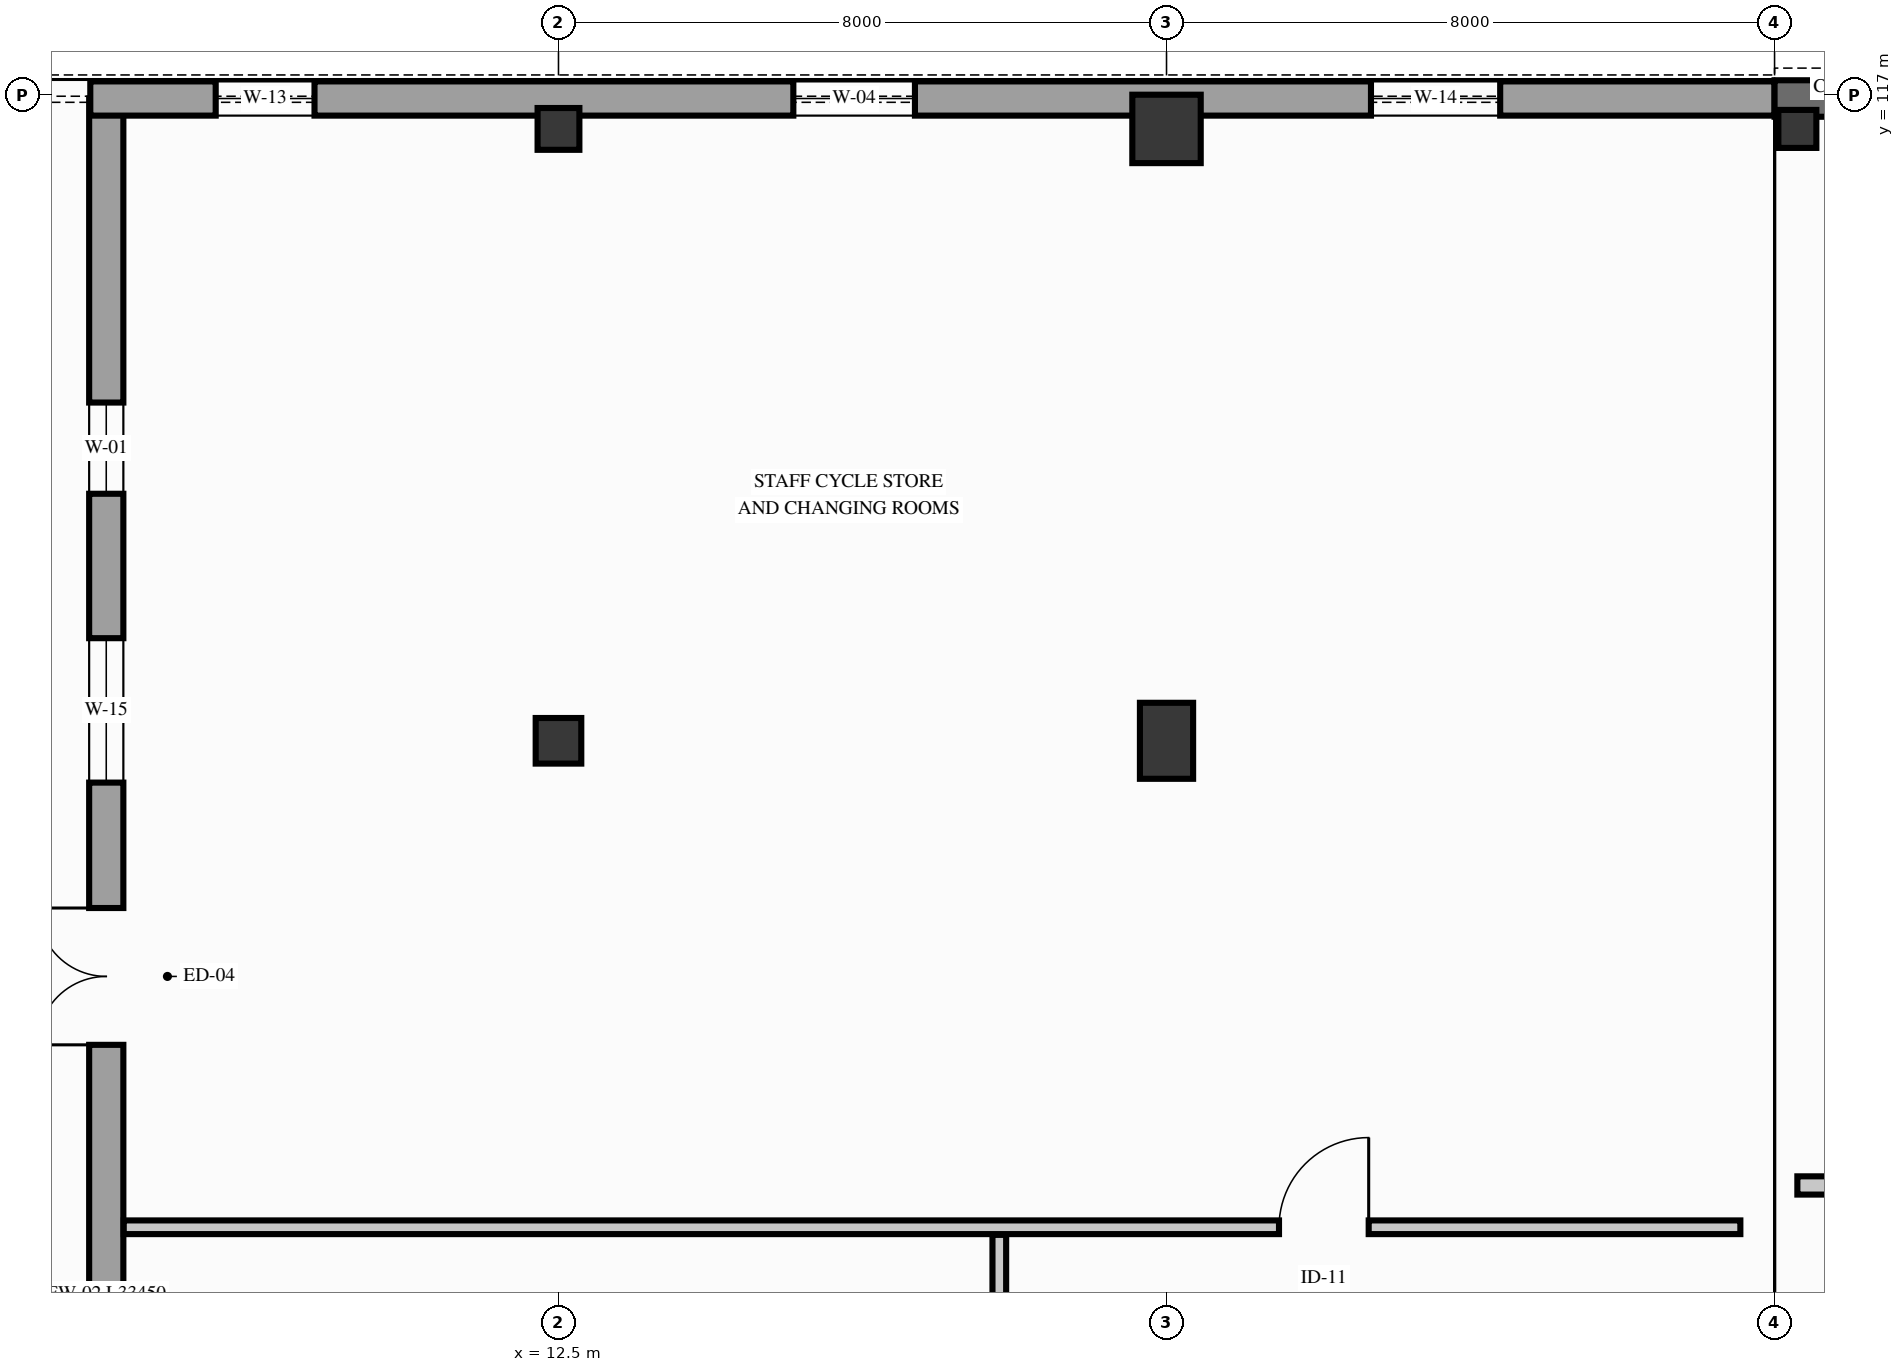
"""IFC4 building model, lengths in metres.
Left out: names, types, materials, properties, quantities, classifications, styles, units other than length and angle.
Written with IfcOpenShell. Run it as: python <this file> out.ifc"""

import sys

from ifc_helpers import new_model, si_unit, direction, frame, frame_2d, origin, origin_2d, place, context, subcontext, project, spatial, rectangle, extrude, element, fill, save


model = new_model("IFC4")
c1 = context("Model", 3, precision=1e-05, world=origin(), true_north=direction((0.0, 1.0)))
c2 = subcontext(c1, "Body", "Model", "MODEL_VIEW")
j1 = project(units=[si_unit("LENGTHUNIT", "METRE"), si_unit("PLANEANGLEUNIT", "RADIAN")], contexts=[c1])
p1 = place(None, origin())
s1 = spatial("IfcSite", under=j1, at=p1, CompositionType="ELEMENT")
p2 = place(p1, origin())
s2 = spatial("IfcBuilding", under=s1, at=p2, CompositionType="ELEMENT")
p3 = place(p2, origin())
s3 = spatial("IfcBuildingStorey", under=s2, at=p3, CompositionType="ELEMENT", Elevation=0.0)
p4 = place(p3, frame((28.8, 116.55, 0.0), z_axis=(0.0, 0.0, 1.0), x_axis=(1.0, 0.0, 0.0)))
e1 = element("IfcColumn", 1, at=p4, inside=s3, PredefinedType="COLUMN", context=c2, shape_type="SweptSolid", body=[
    extrude(rectangle(XDim=0.5, YDim=0.5, at=origin_2d()), origin(), (0.0, 0.0, 1.0), 5.1),
])
p5 = place(p3, frame((12.5, 108.5, 0.0), z_axis=(0.0, 0.0, 1.0), x_axis=(1.0, 0.0, 0.0)))
e2 = element("IfcColumn", 2, at=p5, inside=s3, PredefinedType="COLUMN", context=c2, shape_type="SweptSolid", body=[
    extrude(rectangle(XDim=0.6, YDim=0.6, at=origin_2d()), origin(), (0.0, 0.0, 1.0), 5.1),
])
p6 = place(p3, frame((12.5, 116.55, 0.0), z_axis=(0.0, 0.0, 1.0), x_axis=(1.0, 0.0, 0.0)))
e3 = element("IfcColumn", 3, at=p6, inside=s3, PredefinedType="COLUMN", context=c2, shape_type="SweptSolid", body=[
    extrude(rectangle(XDim=0.55, YDim=0.55, at=origin_2d()), origin(), (0.0, 0.0, 1.0), 5.1),
])
p7 = place(p3, frame((20.5, 108.5, 0.0), z_axis=(0.0, 0.0, 1.0), x_axis=(1.0, 0.0, 0.0)))
e4 = element("IfcColumn", 4, at=p7, inside=s3, PredefinedType="COLUMN", context=c2, shape_type="SweptSolid", body=[
    extrude(rectangle(XDim=0.7, YDim=1.0, at=origin_2d()), origin(), (0.0, 0.0, 1.0), 5.1),
])
p8 = place(p3, frame((20.5, 116.55, 0.0), z_axis=(0.0, 0.0, 1.0), x_axis=(1.0, 0.0, 0.0)))
e5 = element("IfcColumn", 5, at=p8, inside=s3, PredefinedType="COLUMN", context=c2, shape_type="SweptSolid", body=[
    extrude(rectangle(XDim=0.9, YDim=0.9, at=origin_2d()), origin(), (0.0, 0.0, 1.0), 5.1),
])
p9 = place(p3, frame((6.55, 83.5, 0.0), z_axis=(0.0, 0.0, 1.0), x_axis=(0.0, 1.0, 0.0)))
e6 = element("IfcWall", 6, at=p9, inside=s3, PredefinedType="SOLIDWALL", context=c2, shape_type="SweptSolid", body=[
    extrude(rectangle(XDim=33.45, YDim=0.45, at=frame_2d((16.725, 0.0))), origin(), (0.0, 0.0, 1.0), 4.418),
])
p10 = place(p9, frame((21.0, 0.0, 0.0)))
e7 = element("IfcOpeningElement", 7, at=p10, cuts=e6, PredefinedType="OPENING", context=c2, shape_type="SweptSolid", body=[
    extrude(rectangle(XDim=1.8, YDim=2.4, at=frame_2d((0.9, 1.2))), frame((0.0, 0.235, 0.0), z_axis=(0.0, -1.0, 0.0), x_axis=(1.0, 0.0, 0.0)), (0.0, 0.0, 1.0), 0.47),
])
p11 = place(p9, frame((1.65, 0.0, 0.85)))
e8 = element("IfcOpeningElement", 8, at=p11, cuts=e6, PredefinedType="OPENING", context=c2, shape_type="SweptSolid", body=[
    extrude(rectangle(XDim=1.3, YDim=2.15, at=frame_2d((0.65, 1.075))), frame((0.0, 0.235, 0.0), z_axis=(0.0, -1.0, 0.0), x_axis=(1.0, 0.0, 0.0)), (0.0, 0.0, 1.0), 0.47),
])
p12 = place(p9, frame((5.45, 0.0, 0.85)))
e9 = element("IfcOpeningElement", 9, at=p12, cuts=e6, PredefinedType="OPENING", context=c2, shape_type="SweptSolid", body=[
    extrude(rectangle(XDim=1.5, YDim=2.3, at=frame_2d((0.75, 1.15))), frame((0.0, 0.235, 0.0), z_axis=(0.0, -1.0, 0.0), x_axis=(1.0, 0.0, 0.0)), (0.0, 0.0, 1.0), 0.47),
])
p13 = place(p9, frame((9.25, 0.0, 0.85)))
e10 = element("IfcOpeningElement", 10, at=p13, cuts=e6, PredefinedType="OPENING", context=c2, shape_type="SweptSolid", body=[
    extrude(rectangle(XDim=1.6, YDim=2.4, at=frame_2d((0.8, 1.2))), frame((0.0, 0.235, 0.0), z_axis=(0.0, -1.0, 0.0), x_axis=(1.0, 0.0, 0.0)), (0.0, 0.0, 1.0), 0.47),
])
p14 = place(p9, frame((13.05, 0.0, 0.85)))
e11 = element("IfcOpeningElement", 11, at=p14, cuts=e6, PredefinedType="OPENING", context=c2, shape_type="SweptSolid", body=[
    extrude(rectangle(XDim=1.4, YDim=2.2, at=frame_2d((0.7, 1.1))), frame((0.0, 0.235, 0.0), z_axis=(0.0, -1.0, 0.0), x_axis=(1.0, 0.0, 0.0)), (0.0, 0.0, 1.0), 0.47),
])
p15 = place(p9, frame((24.45, 0.0, 0.85)))
e12 = element("IfcOpeningElement", 12, at=p15, cuts=e6, PredefinedType="OPENING", context=c2, shape_type="SweptSolid", body=[
    extrude(rectangle(XDim=1.9, YDim=2.45, at=frame_2d((0.95, 1.225))), frame((0.0, 0.235, 0.0), z_axis=(0.0, -1.0, 0.0), x_axis=(1.0, 0.0, 0.0)), (0.0, 0.0, 1.0), 0.47),
])
p16 = place(p9, frame((28.25, 0.0, 0.85)))
e13 = element("IfcOpeningElement", 13, at=p16, cuts=e6, PredefinedType="OPENING", context=c2, shape_type="SweptSolid", body=[
    extrude(rectangle(XDim=1.2, YDim=2.1, at=frame_2d((0.6, 1.05))), frame((0.0, 0.235, 0.0), z_axis=(0.0, -1.0, 0.0), x_axis=(1.0, 0.0, 0.0)), (0.0, 0.0, 1.0), 0.47),
])
p17 = place(p3, frame((6.34, 116.95, 0.0), z_axis=(0.0, 0.0, 1.0), x_axis=(1.0, 0.0, 0.0)))
e14 = element("IfcWall", 14, at=p17, inside=s3, PredefinedType="SOLIDWALL", context=c2, shape_type="SweptSolid", body=[
    extrude(rectangle(XDim=22.16, YDim=0.45, at=frame_2d((11.08, 0.0))), origin(), (0.0, 0.0, 1.0), 4.88),
])
p18 = place(p17, frame((1.65, 0.0, 0.85)))
e15 = element("IfcOpeningElement", 15, at=p18, cuts=e14, PredefinedType="OPENING", context=c2, shape_type="SweptSolid", body=[
    extrude(rectangle(XDim=1.3, YDim=2.15, at=frame_2d((0.65, 1.075))), frame((0.0, 0.235, 0.0), z_axis=(0.0, -1.0, 0.0), x_axis=(1.0, 0.0, 0.0)), (0.0, 0.0, 1.0), 0.47),
])
p19 = place(p17, frame((9.25, 0.0, 0.85)))
e16 = element("IfcOpeningElement", 16, at=p19, cuts=e14, PredefinedType="OPENING", context=c2, shape_type="SweptSolid", body=[
    extrude(rectangle(XDim=1.6, YDim=2.4, at=frame_2d((0.8, 1.2))), frame((0.0, 0.235, 0.0), z_axis=(0.0, -1.0, 0.0), x_axis=(1.0, 0.0, 0.0)), (0.0, 0.0, 1.0), 0.47),
])
p20 = place(p17, frame((16.85, 0.0, 0.85)))
e17 = element("IfcOpeningElement", 17, at=p20, cuts=e14, PredefinedType="OPENING", context=c2, shape_type="SweptSolid", body=[
    extrude(rectangle(XDim=1.7, YDim=2.35, at=frame_2d((0.85, 1.175))), frame((0.0, 0.235, 0.0), z_axis=(0.0, -1.0, 0.0), x_axis=(1.0, 0.0, 0.0)), (0.0, 0.0, 1.0), 0.47),
])
p21 = place(p3, frame((28.5, 116.95, 0.0), z_axis=(0.0, 0.0, 1.0), x_axis=(1.0, 0.0, 0.0)))
e18 = element("IfcWall", 18, at=p21, inside=s3, PredefinedType="SOLIDWALL", context=c2, shape_type="SweptSolid", body=[
    extrude(rectangle(XDim=95.25, YDim=0.48, at=frame_2d((47.625, 0.0))), origin(), (0.0, 0.0, 1.0), 4.88),
])
p22 = place(p21, frame((1.65, 0.0, 1.35)))
e19 = element("IfcOpeningElement", 19, at=p22, cuts=e18, PredefinedType="OPENING", context=c2, shape_type="SweptSolid", body=[
    extrude(rectangle(XDim=1.4, YDim=2.2, at=frame_2d((0.7, 1.1))), frame((0.0, 0.25, 0.0), z_axis=(0.0, -1.0, 0.0), x_axis=(1.0, 0.0, 0.0)), (0.0, 0.0, 1.0), 0.5),
])
p23 = place(p21, frame((5.65, 0.0, 1.35)))
e20 = element("IfcOpeningElement", 20, at=p23, cuts=e18, PredefinedType="OPENING", context=c2, shape_type="SweptSolid", body=[
    extrude(rectangle(XDim=1.2, YDim=2.1, at=frame_2d((0.6, 1.05))), frame((0.0, 0.25, 0.0), z_axis=(0.0, -1.0, 0.0), x_axis=(1.0, 0.0, 0.0)), (0.0, 0.0, 1.0), 0.5),
])
p24 = place(p21, frame((13.65, 0.0, 1.35)))
e21 = element("IfcOpeningElement", 21, at=p24, cuts=e18, PredefinedType="OPENING", context=c2, shape_type="SweptSolid", body=[
    extrude(rectangle(XDim=1.0, YDim=1.6, at=frame_2d((0.5, 0.8))), frame((0.0, 0.25, 0.0), z_axis=(0.0, -1.0, 0.0), x_axis=(1.0, 0.0, 0.0)), (0.0, 0.0, 1.0), 0.5),
])
p25 = place(p21, frame((21.65, 0.0, 1.35)))
e22 = element("IfcOpeningElement", 22, at=p25, cuts=e18, PredefinedType="OPENING", context=c2, shape_type="SweptSolid", body=[
    extrude(rectangle(XDim=1.2, YDim=2.1, at=frame_2d((0.6, 1.05))), frame((0.0, 0.25, 0.0), z_axis=(0.0, -1.0, 0.0), x_axis=(1.0, 0.0, 0.0)), (0.0, 0.0, 1.0), 0.5),
])
p26 = place(p21, frame((25.65, 0.0, 1.35)))
e23 = element("IfcOpeningElement", 23, at=p26, cuts=e18, PredefinedType="OPENING", context=c2, shape_type="SweptSolid", body=[
    extrude(rectangle(XDim=1.1, YDim=1.5, at=frame_2d((0.55, 0.75))), frame((0.0, 0.25, 0.0), z_axis=(0.0, -1.0, 0.0), x_axis=(1.0, 0.0, 0.0)), (0.0, 0.0, 1.0), 0.5),
])
p27 = place(p21, frame((29.65, 0.0, 1.35)))
e24 = element("IfcOpeningElement", 24, at=p27, cuts=e18, PredefinedType="OPENING", context=c2, shape_type="SweptSolid", body=[
    extrude(rectangle(XDim=1.0, YDim=1.6, at=frame_2d((0.5, 0.8))), frame((0.0, 0.25, 0.0), z_axis=(0.0, -1.0, 0.0), x_axis=(1.0, 0.0, 0.0)), (0.0, 0.0, 1.0), 0.5),
])
p28 = place(p21, frame((37.65, 0.0, 1.35)))
e25 = element("IfcOpeningElement", 25, at=p28, cuts=e18, PredefinedType="OPENING", context=c2, shape_type="SweptSolid", body=[
    extrude(rectangle(XDim=1.2, YDim=2.1, at=frame_2d((0.6, 1.05))), frame((0.0, 0.25, 0.0), z_axis=(0.0, -1.0, 0.0), x_axis=(1.0, 0.0, 0.0)), (0.0, 0.0, 1.0), 0.5),
])
p29 = place(p21, frame((41.65, 0.0, 1.35)))
e26 = element("IfcOpeningElement", 26, at=p29, cuts=e18, PredefinedType="OPENING", context=c2, shape_type="SweptSolid", body=[
    extrude(rectangle(XDim=1.1, YDim=1.5, at=frame_2d((0.55, 0.75))), frame((0.0, 0.25, 0.0), z_axis=(0.0, -1.0, 0.0), x_axis=(1.0, 0.0, 0.0)), (0.0, 0.0, 1.0), 0.5),
])
p30 = place(p21, frame((45.65, 0.0, 1.35)))
e27 = element("IfcOpeningElement", 27, at=p30, cuts=e18, PredefinedType="OPENING", context=c2, shape_type="SweptSolid", body=[
    extrude(rectangle(XDim=1.0, YDim=1.6, at=frame_2d((0.5, 0.8))), frame((0.0, 0.25, 0.0), z_axis=(0.0, -1.0, 0.0), x_axis=(1.0, 0.0, 0.0)), (0.0, 0.0, 1.0), 0.5),
])
p31 = place(p21, frame((57.65, 0.0, 1.35)))
e28 = element("IfcOpeningElement", 28, at=p31, cuts=e18, PredefinedType="OPENING", context=c2, shape_type="SweptSolid", body=[
    extrude(rectangle(XDim=1.1, YDim=1.5, at=frame_2d((0.55, 0.75))), frame((0.0, 0.25, 0.0), z_axis=(0.0, -1.0, 0.0), x_axis=(1.0, 0.0, 0.0)), (0.0, 0.0, 1.0), 0.5),
])
p32 = place(p21, frame((61.65, 0.0, 1.35)))
e29 = element("IfcOpeningElement", 29, at=p32, cuts=e18, PredefinedType="OPENING", context=c2, shape_type="SweptSolid", body=[
    extrude(rectangle(XDim=1.0, YDim=1.6, at=frame_2d((0.5, 0.8))), frame((0.0, 0.25, 0.0), z_axis=(0.0, -1.0, 0.0), x_axis=(1.0, 0.0, 0.0)), (0.0, 0.0, 1.0), 0.5),
])
p33 = place(p21, frame((69.65, 0.0, 1.35)))
e30 = element("IfcOpeningElement", 30, at=p33, cuts=e18, PredefinedType="OPENING", context=c2, shape_type="SweptSolid", body=[
    extrude(rectangle(XDim=1.2, YDim=2.1, at=frame_2d((0.6, 1.05))), frame((0.0, 0.25, 0.0), z_axis=(0.0, -1.0, 0.0), x_axis=(1.0, 0.0, 0.0)), (0.0, 0.0, 1.0), 0.5),
])
p34 = place(p21, frame((89.65, 0.0, 1.35)))
e31 = element("IfcOpeningElement", 31, at=p34, cuts=e18, PredefinedType="OPENING", context=c2, shape_type="SweptSolid", body=[
    extrude(rectangle(XDim=1.1, YDim=1.5, at=frame_2d((0.55, 0.75))), frame((0.0, 0.25, 0.0), z_axis=(0.0, -1.0, 0.0), x_axis=(1.0, 0.0, 0.0)), (0.0, 0.0, 1.0), 0.5),
])
p35 = place(p3, frame((18.3, 84.85, 0.0), z_axis=(0.0, 0.0, 1.0), x_axis=(0.0, 1.0, 0.0)))
e32 = element("IfcWall", 32, at=p35, inside=s3, PredefinedType="PARTITIONING", context=c2, shape_type="SweptSolid", body=[
    extrude(rectangle(XDim=17.15, YDim=0.18, at=frame_2d((8.575, 0.0))), origin(), (0.0, 0.0, 1.0), 4.558),
])
p36 = place(p35, frame((6.0, 0.0, 0.0)))
e33 = element("IfcOpeningElement", 33, at=p36, cuts=e32, PredefinedType="OPENING", context=c2, shape_type="SweptSolid", body=[
    extrude(rectangle(XDim=0.98, YDim=2.16, at=frame_2d((0.49, 1.08))), frame((0.0, 0.1, 0.0), z_axis=(0.0, -1.0, 0.0), x_axis=(1.0, 0.0, 0.0)), (0.0, 0.0, 1.0), 0.2),
])
p37 = place(p3, frame((6.78, 102.1, 0.0), z_axis=(0.0, 0.0, 1.0), x_axis=(1.0, 0.0, 0.0)))
e34 = element("IfcWall", 34, at=p37, inside=s3, PredefinedType="PARTITIONING", context=c2, shape_type="SweptSolid", body=[
    extrude(rectangle(XDim=21.27, YDim=0.18, at=frame_2d((10.635, 0.0))), origin(), (0.0, 0.0, 1.0), 4.428),
])
p38 = place(p37, frame((15.2, 0.0, 0.0)))
e35 = element("IfcOpeningElement", 35, at=p38, cuts=e34, PredefinedType="OPENING", context=c2, shape_type="SweptSolid", body=[
    extrude(rectangle(XDim=1.18, YDim=2.24, at=frame_2d((0.59, 1.12))), frame((0.0, 0.1, 0.0), z_axis=(0.0, -1.0, 0.0), x_axis=(1.0, 0.0, 0.0)), (0.0, 0.0, 1.0), 0.2),
])
p39 = place(p3, frame((28.8, 102.65, 0.0), z_axis=(0.0, 0.0, 1.0), x_axis=(1.0, 0.0, 0.0)))
e36 = element("IfcWall", 36, at=p39, inside=s3, PredefinedType="PARTITIONING", context=c2, shape_type="SweptSolid", body=[
    extrude(rectangle(XDim=56.8, YDim=0.24, at=frame_2d((28.4, 0.0))), origin(), (0.0, 0.0, 1.0), 4.298),
])
p40 = place(p39, frame((3.5, 0.0, 0.0)))
e37 = element("IfcOpeningElement", 37, at=p40, cuts=e36, PredefinedType="OPENING", context=c2, shape_type="SweptSolid", body=[
    extrude(rectangle(XDim=1.0, YDim=2.15, at=frame_2d((0.5, 1.075))), frame((0.0, 0.13, 0.0), z_axis=(0.0, -1.0, 0.0), x_axis=(1.0, 0.0, 0.0)), (0.0, 0.0, 1.0), 0.26),
])
p41 = place(p39, frame((11.7, 0.0, 0.0)))
e38 = element("IfcOpeningElement", 38, at=p41, cuts=e36, PredefinedType="OPENING", context=c2, shape_type="SweptSolid", body=[
    extrude(rectangle(XDim=1.0, YDim=2.15, at=frame_2d((0.5, 1.075))), frame((0.0, 0.13, 0.0), z_axis=(0.0, -1.0, 0.0), x_axis=(1.0, 0.0, 0.0)), (0.0, 0.0, 1.0), 0.26),
])
p42 = place(p39, frame((19.9, 0.0, 0.0)))
e39 = element("IfcOpeningElement", 39, at=p42, cuts=e36, PredefinedType="OPENING", context=c2, shape_type="SweptSolid", body=[
    extrude(rectangle(XDim=1.0, YDim=2.15, at=frame_2d((0.5, 1.075))), frame((0.0, 0.13, 0.0), z_axis=(0.0, -1.0, 0.0), x_axis=(1.0, 0.0, 0.0)), (0.0, 0.0, 1.0), 0.26),
])
p43 = place(p39, frame((28.1, 0.0, 0.0)))
e40 = element("IfcOpeningElement", 40, at=p43, cuts=e36, PredefinedType="OPENING", context=c2, shape_type="SweptSolid", body=[
    extrude(rectangle(XDim=1.0, YDim=2.15, at=frame_2d((0.5, 1.075))), frame((0.0, 0.13, 0.0), z_axis=(0.0, -1.0, 0.0), x_axis=(1.0, 0.0, 0.0)), (0.0, 0.0, 1.0), 0.26),
])
p44 = place(p39, frame((36.3, 0.0, 0.0)))
e41 = element("IfcOpeningElement", 41, at=p44, cuts=e36, PredefinedType="OPENING", context=c2, shape_type="SweptSolid", body=[
    extrude(rectangle(XDim=1.0, YDim=2.15, at=frame_2d((0.5, 1.075))), frame((0.0, 0.13, 0.0), z_axis=(0.0, -1.0, 0.0), x_axis=(1.0, 0.0, 0.0)), (0.0, 0.0, 1.0), 0.26),
])
p45 = place(p39, frame((44.5, 0.0, 0.0)))
e42 = element("IfcOpeningElement", 42, at=p45, cuts=e36, PredefinedType="OPENING", context=c2, shape_type="SweptSolid", body=[
    extrude(rectangle(XDim=1.0, YDim=2.15, at=frame_2d((0.5, 1.075))), frame((0.0, 0.13, 0.0), z_axis=(0.0, -1.0, 0.0), x_axis=(1.0, 0.0, 0.0)), (0.0, 0.0, 1.0), 0.26),
])
p46 = place(p10, origin())
e43 = element("IfcDoor", 43, at=p46, inside=s3, OperationType="DOUBLE_DOOR_SINGLE_SWING", PredefinedType="DOOR", context=c2, shape_type="SweptSolid", body=[
    extrude(rectangle(XDim=1.8, YDim=2.4, at=frame_2d((0.9, 1.2))), frame((0.0, 0.025, 0.0), z_axis=(0.0, -1.0, 0.0), x_axis=(1.0, 0.0, 0.0)), (0.0, 0.0, 1.0), 0.05),
])
fill(e7, e43)
p47 = place(p15, origin())
e44 = element("IfcWindow", 44, at=p47, inside=s3, PartitioningType="SINGLE_PANEL", PredefinedType="WINDOW", context=c2, shape_type="SweptSolid", body=[
    extrude(rectangle(XDim=1.9, YDim=2.45, at=frame_2d((0.95, 1.225))), frame((0.0, 0.03, 0.0), z_axis=(0.0, -1.0, 0.0), x_axis=(1.0, 0.0, 0.0)), (0.0, 0.0, 1.0), 0.06),
])
fill(e12, e44)
p48 = place(p16, origin())
e45 = element("IfcWindow", 45, at=p48, inside=s3, PartitioningType="SINGLE_PANEL", PredefinedType="WINDOW", context=c2, shape_type="SweptSolid", body=[
    extrude(rectangle(XDim=1.2, YDim=2.1, at=frame_2d((0.6, 1.05))), frame((0.0, 0.03, 0.0), z_axis=(0.0, -1.0, 0.0), x_axis=(1.0, 0.0, 0.0)), (0.0, 0.0, 1.0), 0.06),
])
fill(e13, e45)
p49 = place(p18, origin())
e46 = element("IfcWindow", 46, at=p49, inside=s3, PartitioningType="SINGLE_PANEL", PredefinedType="WINDOW", context=c2, shape_type="SweptSolid", body=[
    extrude(rectangle(XDim=1.3, YDim=2.15, at=frame_2d((0.65, 1.075))), frame((0.0, 0.03, 0.0), z_axis=(0.0, -1.0, 0.0), x_axis=(1.0, 0.0, 0.0)), (0.0, 0.0, 1.0), 0.06),
])
fill(e15, e46)
p50 = place(p19, origin())
e47 = element("IfcWindow", 47, at=p50, inside=s3, PartitioningType="SINGLE_PANEL", PredefinedType="WINDOW", context=c2, shape_type="SweptSolid", body=[
    extrude(rectangle(XDim=1.6, YDim=2.4, at=frame_2d((0.8, 1.2))), frame((0.0, 0.03, 0.0), z_axis=(0.0, -1.0, 0.0), x_axis=(1.0, 0.0, 0.0)), (0.0, 0.0, 1.0), 0.06),
])
fill(e16, e47)
p51 = place(p20, origin())
e48 = element("IfcWindow", 48, at=p51, inside=s3, PartitioningType="SINGLE_PANEL", PredefinedType="WINDOW", context=c2, shape_type="SweptSolid", body=[
    extrude(rectangle(XDim=1.7, YDim=2.35, at=frame_2d((0.85, 1.175))), frame((0.0, 0.03, 0.0), z_axis=(0.0, -1.0, 0.0), x_axis=(1.0, 0.0, 0.0)), (0.0, 0.0, 1.0), 0.06),
])
fill(e17, e48)
p52 = place(p38, origin())
e49 = element("IfcDoor", 49, at=p52, inside=s3, OperationType="SINGLE_SWING_RIGHT", PredefinedType="DOOR", context=c2, shape_type="SweptSolid", body=[
    extrude(rectangle(XDim=1.18, YDim=2.24, at=frame_2d((0.59, 1.12))), frame((0.0, 0.025, 0.0), z_axis=(0.0, -1.0, 0.0), x_axis=(1.0, 0.0, 0.0)), (0.0, 0.0, 1.0), 0.05),
])
fill(e35, e49)
save(model, sys.argv[1])
